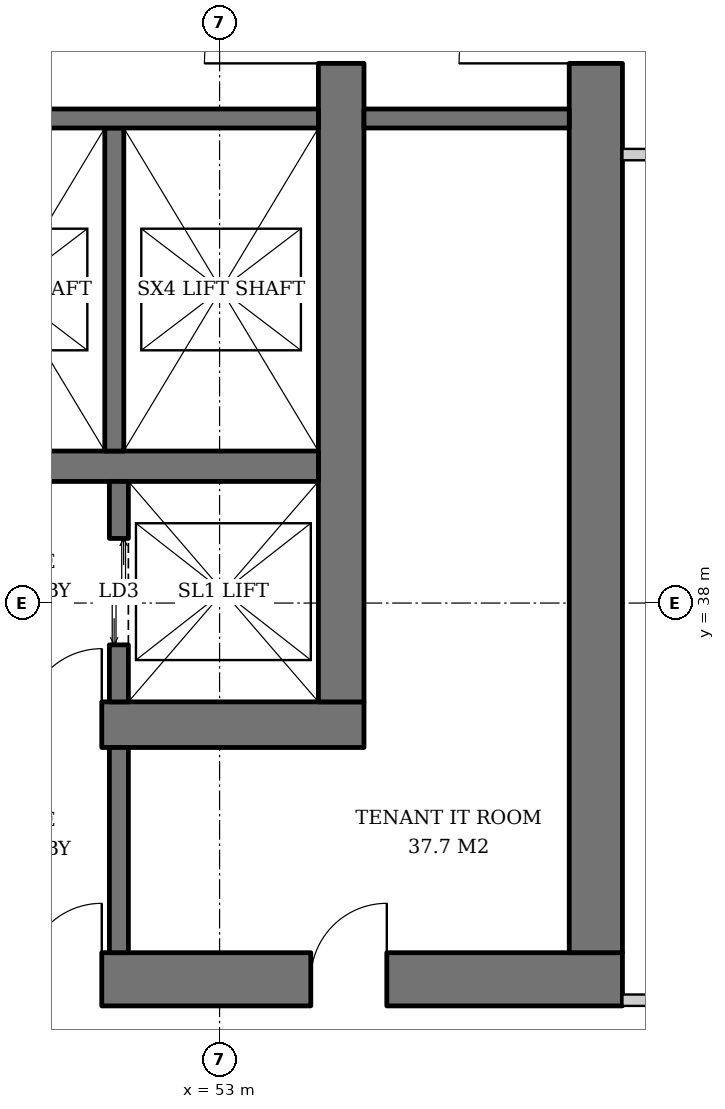
"""IFC4 building model, lengths in metres.
Left out: names, types, materials, properties, quantities, classifications, styles, units other than length and angle.
Written with IfcOpenShell. Run it as: python <this file> out.ifc"""

import sys

from ifc_helpers import new_model, si_unit, direction, frame, frame_2d, origin, place, context, subcontext, project, spatial, rectangle, extrude, element, fill, save


model = new_model("IFC4")
c1 = context("Model", 3, precision=1e-05, world=origin(), true_north=direction((0.0, 1.0)))
c2 = subcontext(c1, "Body", "Model", "MODEL_VIEW")
j1 = project(units=[si_unit("LENGTHUNIT", "METRE"), si_unit("PLANEANGLEUNIT", "RADIAN")], contexts=[c1])
p1 = place(None, origin())
s1 = spatial("IfcSite", under=j1, at=p1, CompositionType="ELEMENT")
p2 = place(p1, origin())
s2 = spatial("IfcBuilding", under=s1, at=p2, CompositionType="ELEMENT")
p3 = place(p2, frame((0.0, 0.0, 116.0)))
s3 = spatial("IfcBuildingStorey", under=s2, at=p3, CompositionType="ELEMENT", Elevation=116.0)
p4 = place(p3, frame((35.1, 36.4, 0.0), z_axis=(0.0, 0.0, 1.0), x_axis=(1.0, 0.0, 0.0)))
e1 = element("IfcWall", 1, at=p4, inside=s3, PredefinedType="SHEAR", context=c2, shape_type="SweptSolid", body=[
    extrude(rectangle(XDim=19.8, YDim=0.6, at=frame_2d((9.9, 0.0))), origin(), (0.0, 0.0, 1.0), 3.8),
])
p5 = place(p4, frame((3.9, 0.0, 0.0)))
e2 = element("IfcOpeningElement", 2, at=p5, cuts=e1, PredefinedType="OPENING", context=c2, shape_type="SweptSolid", body=[
    extrude(rectangle(XDim=1.0, YDim=2.1, at=frame_2d((0.5, 1.05))), frame((0.0, 0.31, 0.0), z_axis=(0.0, -1.0, 0.0), x_axis=(1.0, 0.0, 0.0)), (0.0, 0.0, 1.0), 0.62),
])
p6 = place(p4, frame((15.35, 0.0, 0.0)))
e3 = element("IfcOpeningElement", 3, at=p6, cuts=e1, PredefinedType="OPENING", context=c2, shape_type="SweptSolid", body=[
    extrude(rectangle(XDim=1.0, YDim=2.1, at=frame_2d((0.5, 1.05))), frame((0.0, 0.31, 0.0), z_axis=(0.0, -1.0, 0.0), x_axis=(1.0, 0.0, 0.0)), (0.0, 0.0, 1.0), 0.62),
])
p7 = place(p3, frame((54.6, 36.7, 0.0), z_axis=(0.0, 0.0, 1.0), x_axis=(0.0, 1.0, 0.0)))
e4 = element("IfcWall", 4, at=p7, inside=s3, PredefinedType="SHEAR", context=c2, shape_type="SweptSolid", body=[
    extrude(rectangle(XDim=18.6, YDim=0.6, at=frame_2d((9.3, 0.0))), origin(), (0.0, 0.0, 1.0), 3.8),
])
p8 = place(p7, frame((8.4, 0.0, 0.0)))
e5 = element("IfcOpeningElement", 5, at=p8, cuts=e4, PredefinedType="OPENING", context=c2, shape_type="SweptSolid", body=[
    extrude(rectangle(XDim=1.8, YDim=2.4, at=frame_2d((0.9, 1.2))), frame((0.0, 0.31, 0.0), z_axis=(0.0, -1.0, 0.0), x_axis=(1.0, 0.0, 0.0)), (0.0, 0.0, 1.0), 0.62),
])
p9 = place(p3, frame((31.7, 33.05, 0.0), z_axis=(0.0, 0.0, 1.0), x_axis=(1.0, 0.0, 0.0)))
e6 = element("IfcWall", 6, at=p9, inside=s3, PredefinedType="SHEAR", context=c2, shape_type="SweptSolid", body=[
    extrude(rectangle(XDim=26.6, YDim=0.7, at=frame_2d((13.3, 0.0))), origin(), (0.0, 0.0, 1.0), 3.8),
])
p10 = place(p9, frame((7.3, 0.0, 0.0)))
e7 = element("IfcOpeningElement", 7, at=p10, cuts=e6, PredefinedType="OPENING", context=c2, shape_type="SweptSolid", body=[
    extrude(rectangle(XDim=1.0, YDim=2.1, at=frame_2d((0.5, 1.05))), frame((0.0, 0.36, 0.0), z_axis=(0.0, -1.0, 0.0), x_axis=(1.0, 0.0, 0.0)), (0.0, 0.0, 1.0), 0.72),
])
p11 = place(p9, frame((18.75, 0.0, 0.0)))
e8 = element("IfcOpeningElement", 8, at=p11, cuts=e6, PredefinedType="OPENING", context=c2, shape_type="SweptSolid", body=[
    extrude(rectangle(XDim=1.0, YDim=2.1, at=frame_2d((0.5, 1.05))), frame((0.0, 0.36, 0.0), z_axis=(0.0, -1.0, 0.0), x_axis=(1.0, 0.0, 0.0)), (0.0, 0.0, 1.0), 0.72),
])
p12 = place(p9, frame((3.2, 0.0, 0.0)))
e9 = element("IfcOpeningElement", 9, at=p12, cuts=e6, PredefinedType="OPENING", context=c2, shape_type="SweptSolid", body=[
    extrude(rectangle(XDim=1.0, YDim=2.1, at=frame_2d((0.5, 1.05))), frame((0.0, 0.36, 0.0), z_axis=(0.0, -1.0, 0.0), x_axis=(1.0, 0.0, 0.0)), (0.0, 0.0, 1.0), 0.72),
])
p13 = place(p9, frame((10.42, 0.0, 0.0)))
e10 = element("IfcOpeningElement", 10, at=p13, cuts=e6, PredefinedType="OPENING", context=c2, shape_type="SweptSolid", body=[
    extrude(rectangle(XDim=1.0, YDim=2.1, at=frame_2d((0.5, 1.05))), frame((0.0, 0.36, 0.0), z_axis=(0.0, -1.0, 0.0), x_axis=(1.0, 0.0, 0.0)), (0.0, 0.0, 1.0), 0.72),
])
p14 = place(p9, frame((14.46, 0.0, 0.0)))
e11 = element("IfcOpeningElement", 11, at=p14, cuts=e6, PredefinedType="OPENING", context=c2, shape_type="SweptSolid", body=[
    extrude(rectangle(XDim=1.0, YDim=2.1, at=frame_2d((0.5, 1.05))), frame((0.0, 0.36, 0.0), z_axis=(0.0, -1.0, 0.0), x_axis=(1.0, 0.0, 0.0)), (0.0, 0.0, 1.0), 0.72),
])
p15 = place(p9, frame((22.5, 0.0, 0.0)))
e12 = element("IfcOpeningElement", 12, at=p15, cuts=e6, PredefinedType="OPENING", context=c2, shape_type="SweptSolid", body=[
    extrude(rectangle(XDim=1.0, YDim=2.1, at=frame_2d((0.5, 1.05))), frame((0.0, 0.36, 0.0), z_axis=(0.0, -1.0, 0.0), x_axis=(1.0, 0.0, 0.0)), (0.0, 0.0, 1.0), 0.72),
])
p16 = place(p3, frame((57.95, 33.4, 0.0), z_axis=(0.0, 0.0, 1.0), x_axis=(0.0, 1.0, 0.0)))
e13 = element("IfcWall", 13, at=p16, inside=s3, PredefinedType="SHEAR", context=c2, shape_type="SweptSolid", body=[
    extrude(rectangle(XDim=25.2, YDim=0.7, at=frame_2d((12.6, 0.0))), origin(), (0.0, 0.0, 1.0), 3.8),
])
p17 = place(p16, frame((11.7, 0.0, 0.0)))
e14 = element("IfcOpeningElement", 14, at=p17, cuts=e13, PredefinedType="OPENING", context=c2, shape_type="SweptSolid", body=[
    extrude(rectangle(XDim=1.8, YDim=2.4, at=frame_2d((0.9, 1.2))), frame((0.0, 0.36, 0.0), z_axis=(0.0, -1.0, 0.0), x_axis=(1.0, 0.0, 0.0)), (0.0, 0.0, 1.0), 0.72),
])
p18 = place(p3, frame((35.7, 39.8, 0.0), z_axis=(0.0, 0.0, 1.0), x_axis=(1.0, 0.0, 0.0)))
e15 = element("IfcWall", 15, at=p18, inside=s3, PredefinedType="SHEAR", context=c2, shape_type="SweptSolid", body=[
    extrude(rectangle(XDim=18.6, YDim=0.4, at=frame_2d((9.3, 0.0))), origin(), (0.0, 0.0, 1.0), 3.8),
])
p19 = place(p3, frame((51.675, 36.7, 0.0), z_axis=(0.0, 0.0, 1.0), x_axis=(0.0, 1.0, 0.0)))
e16 = element("IfcWall", 16, at=p19, inside=s3, PredefinedType="SHEAR", context=c2, shape_type="SweptSolid", body=[
    extrude(rectangle(XDim=2.9, YDim=0.25, at=frame_2d((1.45, 0.0))), origin(), (0.0, 0.0, 1.0), 3.8),
])
p20 = place(p19, frame((0.75, 0.0, 0.0)))
e17 = element("IfcOpeningElement", 17, at=p20, cuts=e16, PredefinedType="OPENING", context=c2, shape_type="SweptSolid", body=[
    extrude(rectangle(XDim=1.4, YDim=2.4, at=frame_2d((0.7, 1.2))), frame((0.0, 0.135, 0.0), z_axis=(0.0, -1.0, 0.0), x_axis=(1.0, 0.0, 0.0)), (0.0, 0.0, 1.0), 0.27),
])
p21 = place(p3, frame((51.615, 44.25, 0.0), z_axis=(0.0, 0.0, 1.0), x_axis=(0.0, -1.0, 0.0)))
e18 = element("IfcWall", 18, at=p21, inside=s3, PredefinedType="SHEAR", context=c2, shape_type="SweptSolid", body=[
    extrude(rectangle(XDim=4.25, YDim=0.25, at=frame_2d((2.125, 0.0))), origin(), (0.0, 0.0, 1.0), 3.8),
])
p22 = place(p3, frame((48.93, 44.375, 0.0), z_axis=(0.0, 0.0, 1.0), x_axis=(1.0, 0.0, 0.0)))
e19 = element("IfcWall", 19, at=p22, inside=s3, PredefinedType="SHEAR", context=c2, shape_type="SweptSolid", body=[
    extrude(rectangle(XDim=5.37, YDim=0.25, at=frame_2d((2.685, 0.0))), origin(), (0.0, 0.0, 1.0), 3.8),
])
for number, where, z_axis, x_axis in (
    (20, (54.9, 44.375, 0.0), (0.0, 0.0, 1.0), (1.0, 0.0, 0.0)),
    (21, (51.675, 33.4, 0.0), (0.0, 0.0, 1.0), (0.0, 1.0, 0.0)),
):
    element("IfcWall", number, at=place(p3, frame(where, z_axis=z_axis, x_axis=x_axis)), inside=s3, PredefinedType="SOLIDWALL", context=c2, shape_type="SweptSolid", body=[
        extrude(rectangle(XDim=2.7, YDim=0.25, at=frame_2d((1.35, 0.0))), origin(), (0.0, 0.0, 1.0), 3.62),
    ])
for number, where, z_axis, x_axis in (
    (22, (58.3, 32.775, 0.0), (0.0, 0.0, 1.0), (1.0, 0.0, 0.0)),
    (23, (58.3, 43.9, 0.0), (0.0, 0.0, 1.0), (1.0, 0.0, 0.0)),
):
    element("IfcWall", number, at=place(p3, frame(where, z_axis=z_axis, x_axis=x_axis)), inside=s3, PredefinedType="PARTITIONING", context=c2, shape_type="SweptSolid", body=[
        extrude(rectangle(XDim=2.325, YDim=0.15, at=frame_2d((1.163, 0.0))), origin(), (0.0, 0.0, 1.0), 3.62),
    ])
p23 = place(p20, origin())
e24 = element("IfcDoor", 24, at=p23, inside=s3, OperationType="DOUBLE_DOOR_SLIDING", PredefinedType="DOOR", context=c2, shape_type="SweptSolid", body=[
    extrude(rectangle(XDim=1.4, YDim=2.4, at=frame_2d((0.7, 1.2))), frame((0.0, 0.025, 0.0), z_axis=(0.0, -1.0, 0.0), x_axis=(1.0, 0.0, 0.0)), (0.0, 0.0, 1.0), 0.05),
])
fill(e17, e24)
p24 = place(p8, origin())
e25 = element("IfcDoor", 25, at=p24, inside=s3, OperationType="DOUBLE_DOOR_SINGLE_SWING", PredefinedType="DOOR", context=c2, shape_type="SweptSolid", body=[
    extrude(rectangle(XDim=1.8, YDim=2.4, at=frame_2d((0.9, 1.2))), frame((0.0, 0.025, 0.0), z_axis=(0.0, -1.0, 0.0), x_axis=(1.0, 0.0, 0.0)), (0.0, 0.0, 1.0), 0.05),
])
fill(e5, e25)
p25 = place(p6, origin())
e26 = element("IfcDoor", 26, at=p25, inside=s3, OperationType="SINGLE_SWING_RIGHT", PredefinedType="DOOR", context=c2, shape_type="SweptSolid", body=[
    extrude(rectangle(XDim=1.0, YDim=2.1, at=frame_2d((0.5, 1.05))), frame((0.0, 0.025, 0.0), z_axis=(0.0, -1.0, 0.0), x_axis=(1.0, 0.0, 0.0)), (0.0, 0.0, 1.0), 0.05),
])
fill(e3, e26)
p26 = place(p17, origin())
e27 = element("IfcDoor", 27, at=p26, inside=s3, OperationType="DOUBLE_DOOR_SINGLE_SWING", PredefinedType="DOOR", context=c2, shape_type="SweptSolid", body=[
    extrude(rectangle(XDim=1.8, YDim=2.4, at=frame_2d((0.9, 1.2))), frame((0.0, 0.025, 0.0), z_axis=(0.0, -1.0, 0.0), x_axis=(1.0, 0.0, 0.0)), (0.0, 0.0, 1.0), 0.05),
])
fill(e14, e27)
p27 = place(p11, origin())
e28 = element("IfcDoor", 28, at=p27, inside=s3, OperationType="SINGLE_SWING_RIGHT", PredefinedType="DOOR", context=c2, shape_type="SweptSolid", body=[
    extrude(rectangle(XDim=1.0, YDim=2.1, at=frame_2d((0.5, 1.05))), frame((0.0, 0.025, 0.0), z_axis=(0.0, -1.0, 0.0), x_axis=(1.0, 0.0, 0.0)), (0.0, 0.0, 1.0), 0.05),
])
fill(e8, e28)
p28 = place(p15, origin())
e29 = element("IfcDoor", 29, at=p28, inside=s3, OperationType="SINGLE_SWING_RIGHT", PredefinedType="DOOR", context=c2, shape_type="SweptSolid", body=[
    extrude(rectangle(XDim=1.0, YDim=2.1, at=frame_2d((0.5, 1.05))), frame((0.0, 0.34, 0.0), z_axis=(0.0, -1.0, 0.0), x_axis=(1.0, 0.0, 0.0)), (0.0, 0.0, 1.0), 0.05),
])
fill(e12, e29)
save(model, sys.argv[1])
